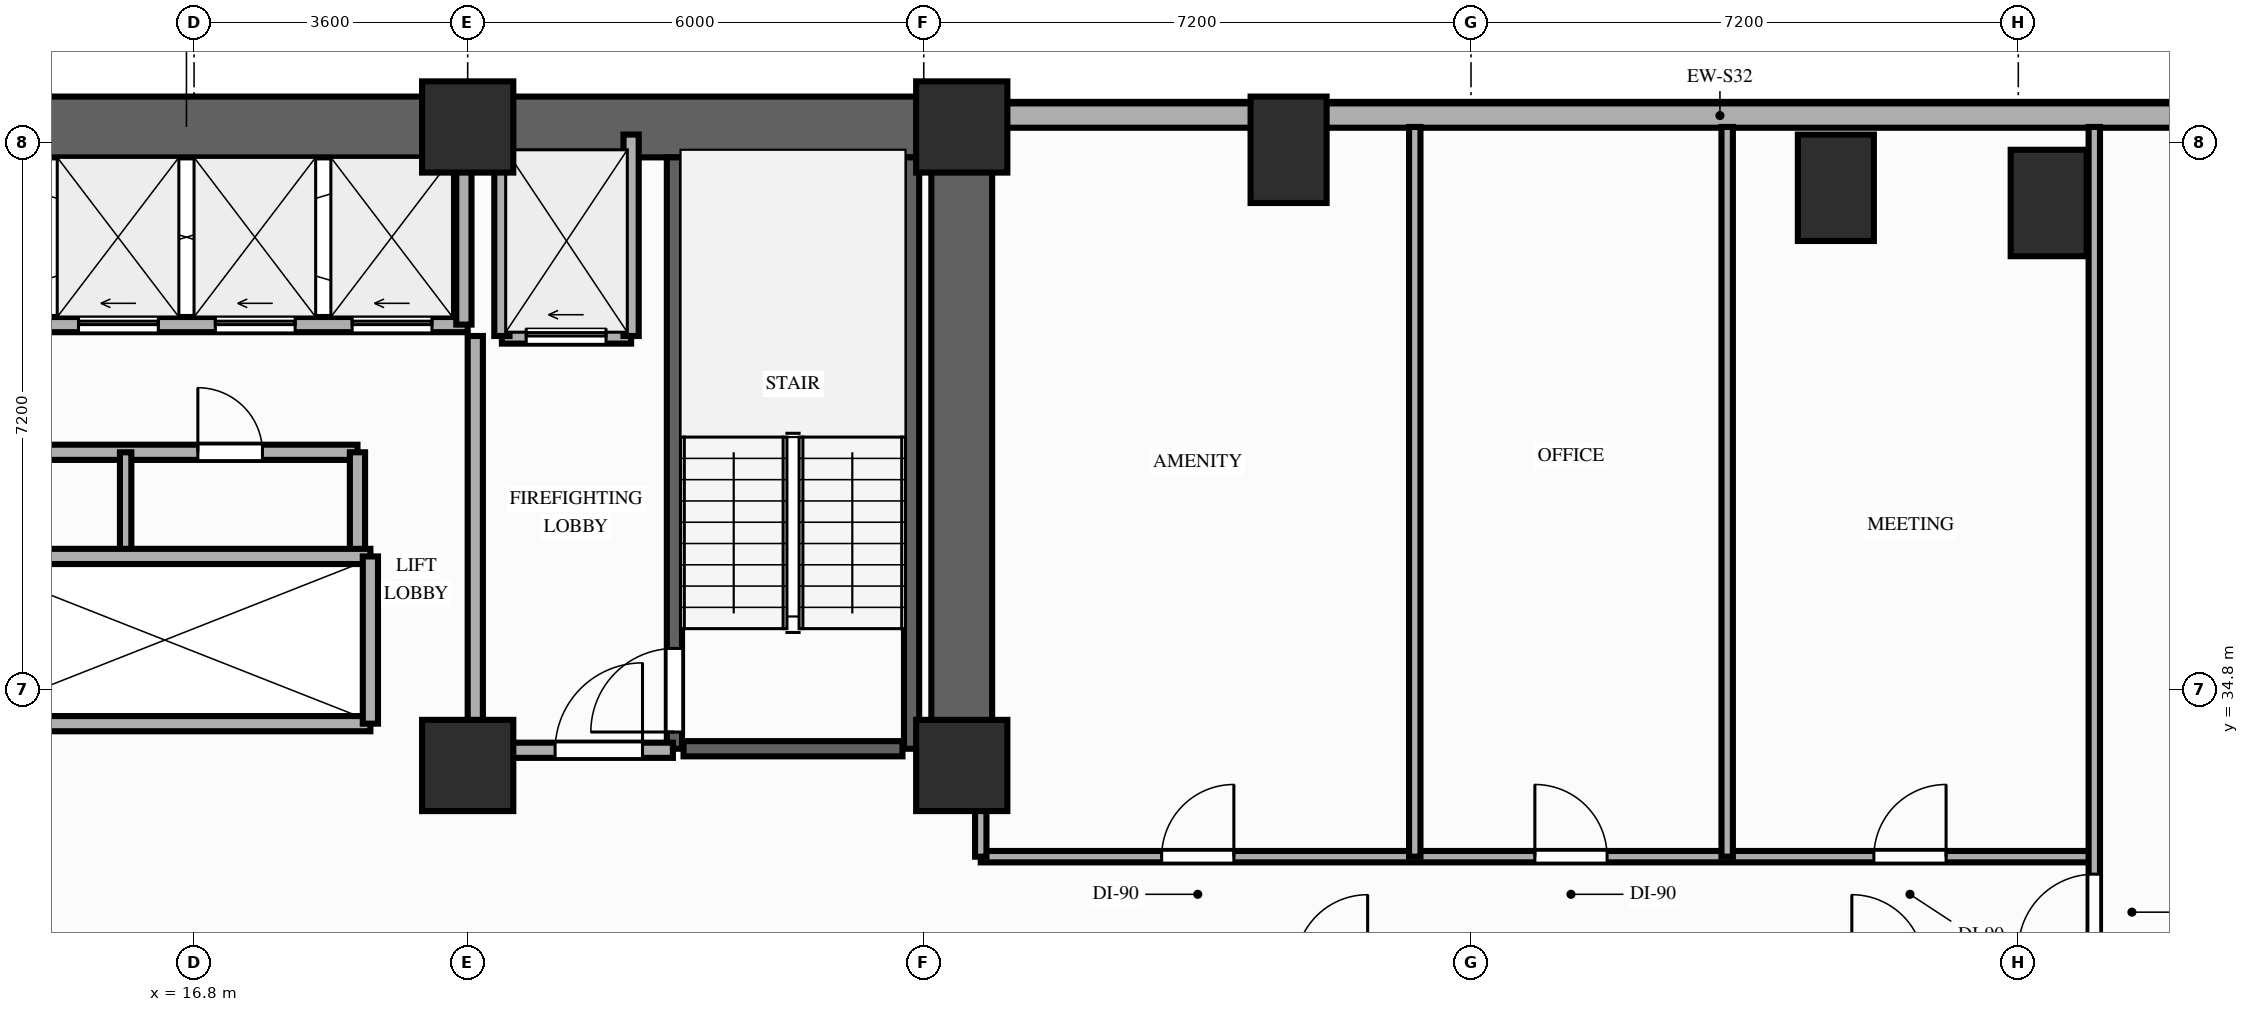
"""IFC4 building model, lengths in metres.
Left out: names, types, materials, properties, quantities, classifications, styles, units other than length and angle.
Written with IfcOpenShell. Run it as: python <this file> out.ifc"""

import sys

from ifc_helpers import new_model, si_unit, direction, frame, frame_2d, origin, origin_2d, place, context, subcontext, project, spatial, rectangle, extrude, element, fill, save


model = new_model("IFC4")
c1 = context("Model", 3, precision=1e-05, world=origin(), true_north=direction((0.0, 1.0)))
c2 = subcontext(c1, "Body", "Model", "MODEL_VIEW")
j1 = project(units=[si_unit("LENGTHUNIT", "METRE"), si_unit("PLANEANGLEUNIT", "RADIAN")], contexts=[c1])
p1 = place(None, origin())
s1 = spatial("IfcSite", under=j1, at=p1, CompositionType="ELEMENT")
p2 = place(p1, origin())
s2 = spatial("IfcBuilding", under=s1, at=p2, CompositionType="ELEMENT")
p3 = place(p2, frame((0.0, 0.0, 43.6)))
s3 = spatial("IfcBuildingStorey", under=s2, at=p3, CompositionType="ELEMENT", Elevation=43.6)
for number, where, z_axis, x_axis in (
    (1, (20.4, 33.8, 0.0), (0.0, 0.0, 1.0), (1.0, 0.0, 0.0)),
    (2, (26.9, 33.8, 0.0), (0.0, 0.0, 1.0), (1.0, 0.0, 0.0)),
    (3, (20.4, 42.2, 0.0), (0.0, 0.0, 1.0), (1.0, 0.0, 0.0)),
    (4, (26.9, 42.2, 0.0), (0.0, 0.0, 1.0), (1.0, 0.0, 0.0)),
):
    element("IfcColumn", number, at=place(p3, frame(where, z_axis=z_axis, x_axis=x_axis)), inside=s3, PredefinedType="COLUMN", context=c2, shape_type="SweptSolid", body=[
        extrude(rectangle(XDim=1.2, YDim=1.2, at=origin_2d()), origin(), (0.0, 0.0, 1.0), 3.2),
    ])
for number, where, z_axis, x_axis in (
    (5, (31.2, 41.9, 0.0), (0.0, 0.0, 1.0), (1.0, 0.0, 0.0)),
    (6, (38.4, 41.4, 0.0), (0.0, 0.0, 1.0), (1.0, 0.0, 0.0)),
    (7, (41.2, 41.2, 0.0), (0.0, 0.0, 1.0), (1.0, 0.0, 0.0)),
):
    element("IfcColumn", number, at=place(p3, frame(where, z_axis=z_axis, x_axis=x_axis)), inside=s3, PredefinedType="COLUMN", context=c2, shape_type="SweptSolid", body=[
        extrude(rectangle(XDim=1.0, YDim=1.4, at=origin_2d()), origin(), (0.0, 0.0, 1.0), 3.2),
    ])
p4 = place(p3, frame((46.4, 42.35, 0.0), z_axis=(0.0, 0.0, 1.0), x_axis=(-1.0, 0.0, 0.0)))
e8 = element("IfcWall", 8, at=p4, inside=s3, PredefinedType="STANDARD", context=c2, shape_type="SweptSolid", body=[
    extrude(rectangle(XDim=19.05, YDim=0.32, at=frame_2d((9.525, 0.0))), origin(), (0.0, 0.0, 1.0), 2.41),
])
p5 = place(p3, frame((6.45, 42.2, 0.0), z_axis=(0.0, 0.0, 1.0), x_axis=(1.0, 0.0, 0.0)))
e9 = element("IfcWall", 9, at=p5, inside=s3, PredefinedType="SHEAR", context=c2, shape_type="SweptSolid", body=[
    extrude(rectangle(XDim=20.45, YDim=0.8, at=frame_2d((10.225, 0.0))), origin(), (0.0, 0.0, 1.0), 3.02),
])
p6 = place(p3, frame((26.9, 33.8, 0.0), z_axis=(0.0, 0.0, 1.0), x_axis=(0.0, 1.0, 0.0)))
e10 = element("IfcWall", 10, at=p6, inside=s3, PredefinedType="SHEAR", context=c2, shape_type="SweptSolid", body=[
    extrude(rectangle(XDim=7.95, YDim=0.8, at=frame_2d((3.975, 0.0))), origin(), (0.0, 0.0, 1.0), 3.02),
])
p7 = place(p3, frame((23.12, 34.02, 0.0), z_axis=(0.0, 0.0, 1.0), x_axis=(0.0, 1.0, 0.0)))
e11 = element("IfcWall", 11, at=p7, inside=s3, PredefinedType="SHEAR", context=c2, shape_type="SweptSolid", body=[
    extrude(rectangle(XDim=7.78, YDim=0.2, at=frame_2d((3.89, 0.0))), origin(), (0.0, 0.0, 1.0), 3.02),
])
p8 = place(p7, frame((0.22, 0.0, 0.0)))
e12 = element("IfcOpeningElement", 12, at=p8, cuts=e11, PredefinedType="OPENING", context=c2, shape_type="SweptSolid", body=[
    extrude(rectangle(XDim=1.1, YDim=2.15, at=frame_2d((0.55, 1.075))), frame((0.0, 0.11, 0.0), z_axis=(0.0, -1.0, 0.0), x_axis=(1.0, 0.0, 0.0)), (0.0, 0.0, 1.0), 0.22),
])
p9 = place(p3, frame((26.24, 34.02, 0.0), z_axis=(0.0, 0.0, 1.0), x_axis=(0.0, 1.0, 0.0)))
e13 = element("IfcWall", 13, at=p9, inside=s3, PredefinedType="SHEAR", context=c2, shape_type="SweptSolid", body=[
    extrude(rectangle(XDim=7.78, YDim=0.2, at=frame_2d((3.89, 0.0))), origin(), (0.0, 0.0, 1.0), 3.02),
])
p10 = place(p3, frame((23.24, 34.02, 0.0), z_axis=(0.0, 0.0, 1.0), x_axis=(1.0, 0.0, 0.0)))
e14 = element("IfcWall", 14, at=p10, inside=s3, PredefinedType="SHEAR", context=c2, shape_type="SweptSolid", body=[
    extrude(rectangle(XDim=2.88, YDim=0.2, at=frame_2d((1.44, 0.0))), origin(), (0.0, 0.0, 1.0), 3.02),
])
p11 = place(p3, frame((20.85, 39.45, 0.0), z_axis=(0.0, 0.0, 1.0), x_axis=(1.0, 0.0, 0.0)))
e15 = element("IfcWall", 15, at=p11, inside=s3, PredefinedType="MOVABLE", context=c2, shape_type="SweptSolid", body=[
    extrude(rectangle(XDim=1.7, YDim=0.2, at=frame_2d((0.85, 0.0))), origin(), (0.0, 0.0, 1.0), 3.02),
])
p12 = place(p11, frame((0.32, 0.0, 0.0)))
e16 = element("IfcOpeningElement", 16, at=p12, cuts=e15, PredefinedType="OPENING", context=c2, shape_type="SweptSolid", body=[
    extrude(rectangle(XDim=1.05, YDim=2.15, at=frame_2d((0.525, 1.075))), frame((0.0, 0.11, 0.0), z_axis=(0.0, -1.0, 0.0), x_axis=(1.0, 0.0, 0.0)), (0.0, 0.0, 1.0), 0.22),
])
for number, where, z_axis, x_axis in (
    (17, (20.85, 39.45, 0.0), (0.0, 0.0, 1.0), (0.0, 1.0, 0.0)),
    (18, (22.55, 39.45, 0.0), (0.0, 0.0, 1.0), (0.0, 1.0, 0.0)),
):
    element("IfcWall", number, at=place(p3, frame(where, z_axis=z_axis, x_axis=x_axis)), inside=s3, PredefinedType="MOVABLE", context=c2, shape_type="SweptSolid", body=[
        extrude(rectangle(XDim=2.65, YDim=0.2, at=frame_2d((1.325, 0.0))), origin(), (0.0, 0.0, 1.0), 2.41),
    ])
p13 = place(p3, frame((20.5, 34.0, 0.0), z_axis=(0.0, 0.0, 1.0), x_axis=(0.0, 1.0, 0.0)))
e19 = element("IfcWall", 19, at=p13, inside=s3, PredefinedType="PARTITIONING", context=c2, shape_type="SweptSolid", body=[
    extrude(rectangle(XDim=5.45, YDim=0.2, at=frame_2d((2.725, 0.0))), origin(), (0.0, 0.0, 1.0), 2.41),
])
p14 = place(p3, frame((20.5, 34.0, 0.0), z_axis=(0.0, 0.0, 1.0), x_axis=(1.0, 0.0, 0.0)))
e20 = element("IfcWall", 20, at=p14, inside=s3, PredefinedType="PARTITIONING", context=c2, shape_type="SweptSolid", body=[
    extrude(rectangle(XDim=2.6, YDim=0.2, at=frame_2d((1.3, 0.0))), origin(), (0.0, 0.0, 1.0), 2.41),
])
p15 = place(p14, frame((1.05, 0.0, 0.0)))
e21 = element("IfcOpeningElement", 21, at=p15, cuts=e20, PredefinedType="OPENING", context=c2, shape_type="SweptSolid", body=[
    extrude(rectangle(XDim=1.15, YDim=2.15, at=frame_2d((0.575, 1.075))), frame((0.0, 0.11, 0.0), z_axis=(0.0, -1.0, 0.0), x_axis=(1.0, 0.0, 0.0)), (0.0, 0.0, 1.0), 0.22),
])
p16 = place(p3, frame((13.0, 39.6, 0.0), z_axis=(0.0, 0.0, 1.0), x_axis=(1.0, 0.0, 0.0)))
e22 = element("IfcWall", 22, at=p16, inside=s3, PredefinedType="MOVABLE", context=c2, shape_type="SweptSolid", body=[
    extrude(rectangle(XDim=7.4, YDim=0.2, at=frame_2d((3.7, 0.0))), origin(), (0.0, 0.0, 1.0), 3.02),
])
p17 = place(p16, frame((0.47, 0.0, 0.0)))
e23 = element("IfcOpeningElement", 23, at=p17, cuts=e22, PredefinedType="OPENING", context=c2, shape_type="SweptSolid", body=[
    extrude(rectangle(XDim=1.05, YDim=2.15, at=frame_2d((0.525, 1.075))), frame((0.0, 0.11, 0.0), z_axis=(0.0, -1.0, 0.0), x_axis=(1.0, 0.0, 0.0)), (0.0, 0.0, 1.0), 0.22),
])
p18 = place(p16, frame((2.28, 0.0, 0.0)))
e24 = element("IfcOpeningElement", 24, at=p18, cuts=e22, PredefinedType="OPENING", context=c2, shape_type="SweptSolid", body=[
    extrude(rectangle(XDim=1.05, YDim=2.15, at=frame_2d((0.525, 1.075))), frame((0.0, 0.11, 0.0), z_axis=(0.0, -1.0, 0.0), x_axis=(1.0, 0.0, 0.0)), (0.0, 0.0, 1.0), 0.22),
])
p19 = place(p16, frame((4.08, 0.0, 0.0)))
e25 = element("IfcOpeningElement", 25, at=p19, cuts=e22, PredefinedType="OPENING", context=c2, shape_type="SweptSolid", body=[
    extrude(rectangle(XDim=1.05, YDim=2.15, at=frame_2d((0.525, 1.075))), frame((0.0, 0.11, 0.0), z_axis=(0.0, -1.0, 0.0), x_axis=(1.0, 0.0, 0.0)), (0.0, 0.0, 1.0), 0.22),
])
p20 = place(p16, frame((5.88, 0.0, 0.0)))
e26 = element("IfcOpeningElement", 26, at=p20, cuts=e22, PredefinedType="OPENING", context=c2, shape_type="SweptSolid", body=[
    extrude(rectangle(XDim=1.05, YDim=2.15, at=frame_2d((0.525, 1.075))), frame((0.0, 0.11, 0.0), z_axis=(0.0, -1.0, 0.0), x_axis=(1.0, 0.0, 0.0)), (0.0, 0.0, 1.0), 0.22),
])
p21 = place(p3, frame((20.35, 39.6, 0.0), z_axis=(0.0, 0.0, 1.0), x_axis=(0.0, 1.0, 0.0)))
e27 = element("IfcWall", 27, at=p21, inside=s3, PredefinedType="MOVABLE", context=c2, shape_type="SweptSolid", body=[
    extrude(rectangle(XDim=2.18, YDim=0.2, at=frame_2d((1.09, 0.0))), origin(), (0.0, 0.0, 1.0), 3.02),
])
p22 = place(p3, frame((13.0, 37.92, 0.0), z_axis=(0.0, 0.0, 1.0), x_axis=(1.0, 0.0, 0.0)))
e28 = element("IfcWall", 28, at=p22, inside=s3, PredefinedType="PARTITIONING", context=c2, shape_type="SweptSolid", body=[
    extrude(rectangle(XDim=5.95, YDim=0.2, at=frame_2d((2.975, 0.0))), origin(), (0.0, 0.0, 1.0), 3.02),
])
p23 = place(p22, frame((0.9, 0.0, 0.0)))
e29 = element("IfcOpeningElement", 29, at=p23, cuts=e28, PredefinedType="OPENING", context=c2, shape_type="SweptSolid", body=[
    extrude(rectangle(XDim=0.85, YDim=2.05, at=frame_2d((0.425, 1.025))), frame((0.0, 0.11, 0.0), z_axis=(0.0, -1.0, 0.0), x_axis=(1.0, 0.0, 0.0)), (0.0, 0.0, 1.0), 0.22),
])
p24 = place(p22, frame((3.85, 0.0, 0.0)))
e30 = element("IfcOpeningElement", 30, at=p24, cuts=e28, PredefinedType="OPENING", context=c2, shape_type="SweptSolid", body=[
    extrude(rectangle(XDim=0.85, YDim=2.05, at=frame_2d((0.425, 1.025))), frame((0.0, 0.11, 0.0), z_axis=(0.0, -1.0, 0.0), x_axis=(1.0, 0.0, 0.0)), (0.0, 0.0, 1.0), 0.22),
])
p25 = place(p3, frame((18.95, 36.6, 0.0), z_axis=(0.0, 0.0, 1.0), x_axis=(0.0, 1.0, 0.0)))
e31 = element("IfcWall", 31, at=p25, inside=s3, PredefinedType="PARTITIONING", context=c2, shape_type="SweptSolid", body=[
    extrude(rectangle(XDim=1.32, YDim=0.2, at=frame_2d((0.66, 0.0))), origin(), (0.0, 0.0, 1.0), 3.02),
])
p26 = place(p3, frame((15.9, 36.6, 0.0), z_axis=(0.0, 0.0, 1.0), x_axis=(0.0, 1.0, 0.0)))
e32 = element("IfcWall", 32, at=p26, inside=s3, PredefinedType="PARTITIONING", context=c2, shape_type="SweptSolid", body=[
    extrude(rectangle(XDim=1.32, YDim=0.15, at=frame_2d((0.66, 0.0))), origin(), (0.0, 0.0, 1.0), 3.02),
])
for number, where, z_axis, x_axis in (
    (33, (13.7, 34.35, 0.0), (0.0, 0.0, 1.0), (1.0, 0.0, 0.0)),
    (34, (13.7, 36.55, 0.0), (0.0, 0.0, 1.0), (1.0, 0.0, 0.0)),
):
    element("IfcWall", number, at=place(p3, frame(where, z_axis=z_axis, x_axis=x_axis)), inside=s3, PredefinedType="MOVABLE", context=c2, shape_type="SweptSolid", body=[
        extrude(rectangle(XDim=5.42, YDim=0.2, at=frame_2d((2.71, 0.0))), origin(), (0.0, 0.0, 1.0), 3.02),
    ])
p27 = place(p3, frame((19.12, 34.35, 0.0), z_axis=(0.0, 0.0, 1.0), x_axis=(0.0, 1.0, 0.0)))
e35 = element("IfcWall", 35, at=p27, inside=s3, PredefinedType="MOVABLE", context=c2, shape_type="SweptSolid", body=[
    extrude(rectangle(XDim=2.2, YDim=0.2, at=frame_2d((1.1, 0.0))), origin(), (0.0, 0.0, 1.0), 3.02),
])
p28 = place(p3, frame((27.15, 32.6, 0.0), z_axis=(0.0, 0.0, 1.0), x_axis=(1.0, 0.0, 0.0)))
e36 = element("IfcWall", 36, at=p28, inside=s3, PredefinedType="PARTITIONING", context=c2, shape_type="SweptSolid", body=[
    extrude(rectangle(XDim=14.65, YDim=0.15, at=frame_2d((7.325, 0.0))), origin(), (0.0, 0.0, 1.0), 2.41),
])
p29 = place(p28, frame((2.38, 0.0, 0.0)))
e37 = element("IfcOpeningElement", 37, at=p29, cuts=e36, PredefinedType="OPENING", context=c2, shape_type="SweptSolid", body=[
    extrude(rectangle(XDim=0.95, YDim=2.15, at=frame_2d((0.475, 1.075))), frame((0.0, 0.085, 0.0), z_axis=(0.0, -1.0, 0.0), x_axis=(1.0, 0.0, 0.0)), (0.0, 0.0, 1.0), 0.17),
])
p30 = place(p28, frame((7.29, 0.0, 0.0)))
e38 = element("IfcOpeningElement", 38, at=p30, cuts=e36, PredefinedType="OPENING", context=c2, shape_type="SweptSolid", body=[
    extrude(rectangle(XDim=0.95, YDim=2.15, at=frame_2d((0.475, 1.075))), frame((0.0, 0.085, 0.0), z_axis=(0.0, -1.0, 0.0), x_axis=(1.0, 0.0, 0.0)), (0.0, 0.0, 1.0), 0.17),
])
p31 = place(p28, frame((11.75, 0.0, 0.0)))
e39 = element("IfcOpeningElement", 39, at=p31, cuts=e36, PredefinedType="OPENING", context=c2, shape_type="SweptSolid", body=[
    extrude(rectangle(XDim=0.95, YDim=2.15, at=frame_2d((0.475, 1.075))), frame((0.0, 0.085, 0.0), z_axis=(0.0, -1.0, 0.0), x_axis=(1.0, 0.0, 0.0)), (0.0, 0.0, 1.0), 0.17),
])
p32 = place(p3, frame((27.15, 32.6, 0.0), z_axis=(0.0, 0.0, 1.0), x_axis=(0.0, 1.0, 0.0)))
e40 = element("IfcWall", 40, at=p32, inside=s3, PredefinedType="PARTITIONING", context=c2, shape_type="SweptSolid", body=[
    extrude(rectangle(XDim=1.08, YDim=0.15, at=frame_2d((0.54, 0.0))), origin(), (0.0, 0.0, 1.0), 2.41),
])
p33 = place(p3, frame((41.8, 26.75, 0.0), z_axis=(0.0, 0.0, 1.0), x_axis=(0.0, 1.0, 0.0)))
e41 = element("IfcWall", 41, at=p33, inside=s3, PredefinedType="PARTITIONING", context=c2, shape_type="SweptSolid", body=[
    extrude(rectangle(XDim=15.45, YDim=0.15, at=frame_2d((7.725, 0.0))), origin(), (0.0, 0.0, 1.0), 2.41),
])
p34 = place(p33, frame((4.62, 0.0, 0.0)))
e42 = element("IfcOpeningElement", 42, at=p34, cuts=e41, PredefinedType="OPENING", context=c2, shape_type="SweptSolid", body=[
    extrude(rectangle(XDim=1.0, YDim=2.15, at=frame_2d((0.5, 1.075))), frame((0.0, 0.085, 0.0), z_axis=(0.0, -1.0, 0.0), x_axis=(1.0, 0.0, 0.0)), (0.0, 0.0, 1.0), 0.17),
])
for number, where, z_axis, x_axis in (
    (43, (32.86, 32.6, 0.0), (0.0, 0.0, 1.0), (0.0, 1.0, 0.0)),
    (44, (36.97, 32.6, 0.0), (0.0, 0.0, 1.0), (0.0, 1.0, 0.0)),
):
    element("IfcWall", number, at=place(p3, frame(where, z_axis=z_axis, x_axis=x_axis)), inside=s3, PredefinedType="PARTITIONING", context=c2, shape_type="SweptSolid", body=[
        extrude(rectangle(XDim=9.6, YDim=0.15, at=frame_2d((4.8, 0.0))), origin(), (0.0, 0.0, 1.0), 2.41),
    ])
p35 = place(p8, origin())
e45 = element("IfcDoor", 45, at=p35, inside=s3, OperationType="SINGLE_SWING_LEFT", PredefinedType="DOOR", context=c2, shape_type="SweptSolid", body=[
    extrude(rectangle(XDim=1.1, YDim=2.15, at=frame_2d((0.55, 1.075))), frame((0.0, 0.025, 0.0), z_axis=(0.0, -1.0, 0.0), x_axis=(1.0, 0.0, 0.0)), (0.0, 0.0, 1.0), 0.05),
])
fill(e12, e45)
p36 = place(p12, origin())
e46 = element("IfcDoor", 46, at=p36, inside=s3, OperationType="SLIDING_TO_LEFT", PredefinedType="DOOR", context=c2, shape_type="SweptSolid", body=[
    extrude(rectangle(XDim=1.05, YDim=2.15, at=frame_2d((0.525, 1.075))), frame((0.0, 0.025, 0.0), z_axis=(0.0, -1.0, 0.0), x_axis=(1.0, 0.0, 0.0)), (0.0, 0.0, 1.0), 0.05),
])
fill(e16, e46)
p37 = place(p15, origin())
e47 = element("IfcDoor", 47, at=p37, inside=s3, OperationType="SINGLE_SWING_RIGHT", PredefinedType="DOOR", context=c2, shape_type="SweptSolid", body=[
    extrude(rectangle(XDim=1.15, YDim=2.15, at=frame_2d((0.575, 1.075))), frame((0.0, 0.025, 0.0), z_axis=(0.0, -1.0, 0.0), x_axis=(1.0, 0.0, 0.0)), (0.0, 0.0, 1.0), 0.05),
])
fill(e21, e47)
p38 = place(p18, origin())
e48 = element("IfcDoor", 48, at=p38, inside=s3, OperationType="SLIDING_TO_LEFT", PredefinedType="DOOR", context=c2, shape_type="SweptSolid", body=[
    extrude(rectangle(XDim=1.05, YDim=2.15, at=frame_2d((0.525, 1.075))), frame((0.0, 0.025, 0.0), z_axis=(0.0, -1.0, 0.0), x_axis=(1.0, 0.0, 0.0)), (0.0, 0.0, 1.0), 0.05),
])
fill(e24, e48)
p39 = place(p19, origin())
e49 = element("IfcDoor", 49, at=p39, inside=s3, OperationType="SLIDING_TO_LEFT", PredefinedType="DOOR", context=c2, shape_type="SweptSolid", body=[
    extrude(rectangle(XDim=1.05, YDim=2.15, at=frame_2d((0.525, 1.075))), frame((0.0, 0.025, 0.0), z_axis=(0.0, -1.0, 0.0), x_axis=(1.0, 0.0, 0.0)), (0.0, 0.0, 1.0), 0.05),
])
fill(e25, e49)
p40 = place(p20, origin())
e50 = element("IfcDoor", 50, at=p40, inside=s3, OperationType="SLIDING_TO_LEFT", PredefinedType="DOOR", context=c2, shape_type="SweptSolid", body=[
    extrude(rectangle(XDim=1.05, YDim=2.15, at=frame_2d((0.525, 1.075))), frame((0.0, 0.025, 0.0), z_axis=(0.0, -1.0, 0.0), x_axis=(1.0, 0.0, 0.0)), (0.0, 0.0, 1.0), 0.05),
])
fill(e26, e50)
p41 = place(p24, origin())
e51 = element("IfcDoor", 51, at=p41, inside=s3, OperationType="SINGLE_SWING_LEFT", PredefinedType="DOOR", context=c2, shape_type="SweptSolid", body=[
    extrude(rectangle(XDim=0.85, YDim=2.05, at=frame_2d((0.425, 1.025))), frame((0.0, 0.025, 0.0), z_axis=(0.0, -1.0, 0.0), x_axis=(1.0, 0.0, 0.0)), (0.0, 0.0, 1.0), 0.05),
])
fill(e30, e51)
p42 = place(p34, origin())
e52 = element("IfcDoor", 52, at=p42, inside=s3, OperationType="SINGLE_SWING_LEFT", PredefinedType="DOOR", context=c2, shape_type="SweptSolid", body=[
    extrude(rectangle(XDim=1.0, YDim=2.15, at=frame_2d((0.5, 1.075))), frame((0.0, 0.025, 0.0), z_axis=(0.0, -1.0, 0.0), x_axis=(1.0, 0.0, 0.0)), (0.0, 0.0, 1.0), 0.05),
])
fill(e42, e52)
p43 = place(p29, origin())
e53 = element("IfcDoor", 53, at=p43, inside=s3, OperationType="SINGLE_SWING_RIGHT", PredefinedType="DOOR", context=c2, shape_type="SweptSolid", body=[
    extrude(rectangle(XDim=0.95, YDim=2.15, at=frame_2d((0.475, 1.075))), frame((0.0, 0.025, 0.0), z_axis=(0.0, -1.0, 0.0), x_axis=(1.0, 0.0, 0.0)), (0.0, 0.0, 1.0), 0.05),
])
fill(e37, e53)
p44 = place(p30, origin())
e54 = element("IfcDoor", 54, at=p44, inside=s3, OperationType="SINGLE_SWING_LEFT", PredefinedType="DOOR", context=c2, shape_type="SweptSolid", body=[
    extrude(rectangle(XDim=0.95, YDim=2.15, at=frame_2d((0.475, 1.075))), frame((0.0, 0.025, 0.0), z_axis=(0.0, -1.0, 0.0), x_axis=(1.0, 0.0, 0.0)), (0.0, 0.0, 1.0), 0.05),
])
fill(e38, e54)
p45 = place(p31, origin())
e55 = element("IfcDoor", 55, at=p45, inside=s3, OperationType="SINGLE_SWING_RIGHT", PredefinedType="DOOR", context=c2, shape_type="SweptSolid", body=[
    extrude(rectangle(XDim=0.95, YDim=2.15, at=frame_2d((0.475, 1.075))), frame((0.0, 0.025, 0.0), z_axis=(0.0, -1.0, 0.0), x_axis=(1.0, 0.0, 0.0)), (0.0, 0.0, 1.0), 0.05),
])
fill(e39, e55)
save(model, sys.argv[1])
